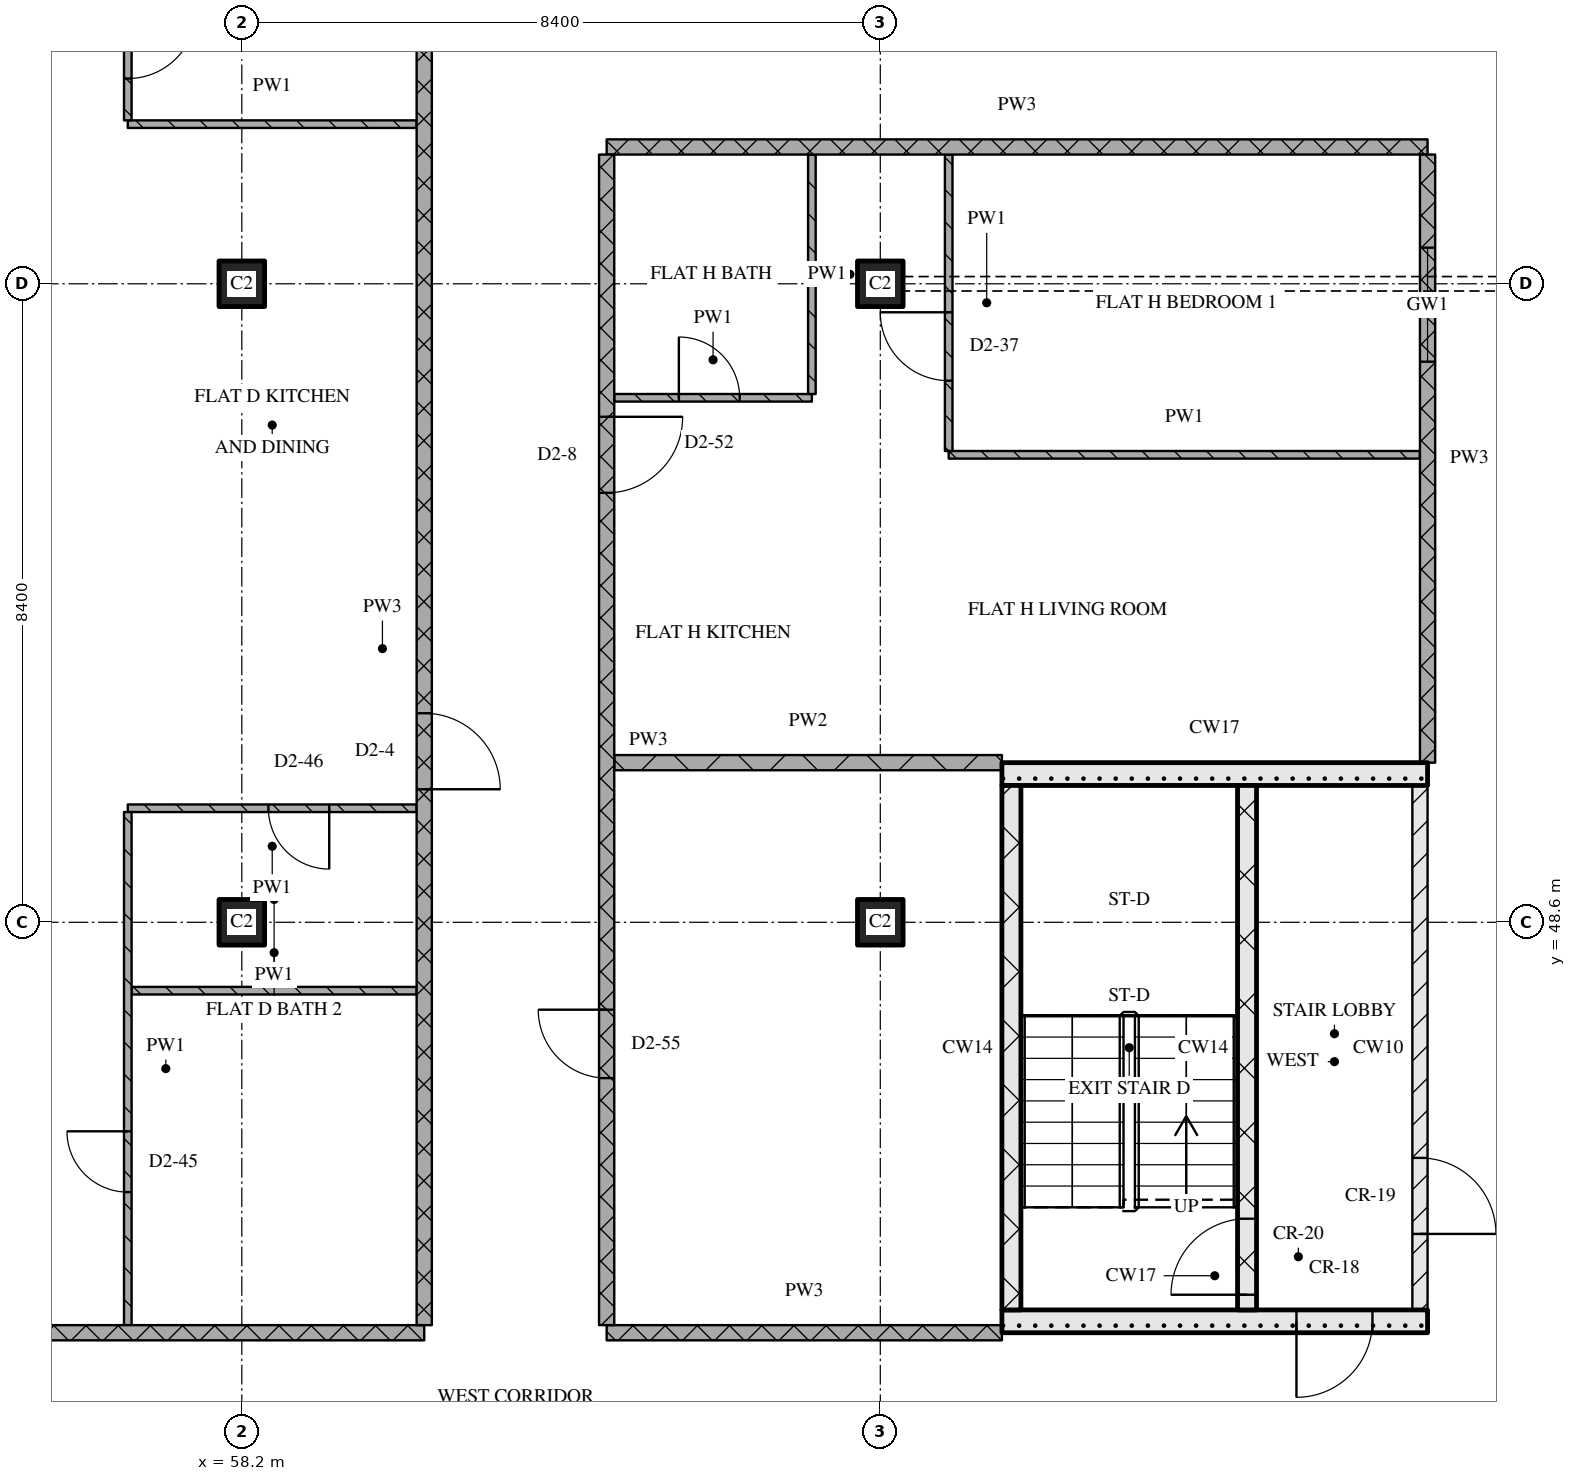
"""IFC4 building model, lengths in metres.
Left out: names, types, materials, properties, quantities, classifications, styles, units other than length and angle.
Written with IfcOpenShell. Run it as: python <this file> out.ifc"""

import sys

from ifc_helpers import new_model, si_unit, direction, frame, frame_2d, origin, origin_2d, place, context, subcontext, project, spatial, rectangle, extrude, element, fill, save


model = new_model("IFC4")
c1 = context("Model", 3, precision=1e-05, world=origin(), true_north=direction((0.0, 1.0)))
c2 = subcontext(c1, "Body", "Model", "MODEL_VIEW")
j1 = project(units=[si_unit("LENGTHUNIT", "METRE"), si_unit("PLANEANGLEUNIT", "RADIAN")], contexts=[c1])
p1 = place(None, origin())
s1 = spatial("IfcSite", under=j1, at=p1, CompositionType="ELEMENT")
p2 = place(p1, origin())
s2 = spatial("IfcBuilding", under=s1, at=p2, CompositionType="ELEMENT")
p3 = place(p2, frame((0.0, 0.0, 223.5)))
s3 = spatial("IfcBuildingStorey", under=s2, at=p3, CompositionType="ELEMENT", Elevation=223.5)
for number, where, z_axis, x_axis in (
    (1, (58.2, 48.6, 0.0), (0.0, 0.0, 1.0), (1.0, 0.0, 0.0)),
    (2, (58.2, 57.0, 0.0), (0.0, 0.0, 1.0), (1.0, 0.0, 0.0)),
    (3, (66.6, 48.6, 0.0), (0.0, 0.0, 1.0), (1.0, 0.0, 0.0)),
    (4, (66.6, 57.0, 0.0), (0.0, 0.0, 1.0), (1.0, 0.0, 0.0)),
):
    element("IfcColumn", number, at=place(p3, frame(where, z_axis=z_axis, x_axis=x_axis)), inside=s3, PredefinedType="COLUMN", context=c2, shape_type="SweptSolid", body=[
        extrude(rectangle(XDim=0.6, YDim=0.6, at=origin_2d()), origin(), (0.0, 0.0, 1.0), 3.6),
    ])
p4 = place(p3, frame((68.2, 43.35, 0.0), z_axis=(0.0, 0.0, 1.0), x_axis=(1.0, 0.0, 0.0)))
e5 = element("IfcWall", 5, at=p4, inside=s3, PredefinedType="SOLIDWALL", context=c2, shape_type="SweptSolid", body=[
    extrude(rectangle(XDim=5.6, YDim=0.3, at=frame_2d((2.8, 0.0))), origin(), (0.0, 0.0, 1.0), 3.32),
])
p5 = place(p4, frame((3.875, 0.0, 0.0)))
e6 = element("IfcOpeningElement", 6, at=p5, cuts=e5, PredefinedType="OPENING", context=c2, shape_type="SweptSolid", body=[
    extrude(rectangle(XDim=1.0, YDim=2.1, at=frame_2d((0.5, 1.05))), frame((0.0, 0.16, 0.0), z_axis=(0.0, -1.0, 0.0), x_axis=(1.0, 0.0, 0.0)), (0.0, 0.0, 1.0), 0.32),
])
p6 = place(p3, frame((68.325, 43.5, 0.0), z_axis=(0.0, 0.0, 1.0), x_axis=(0.0, 1.0, 0.0)))
e7 = element("IfcWall", 7, at=p6, inside=s3, PredefinedType="SOLIDWALL", context=c2, shape_type="SweptSolid", body=[
    extrude(rectangle(XDim=6.9, YDim=0.25, at=frame_2d((3.45, 0.0))), origin(), (0.0, 0.0, 1.0), 3.32),
])
p7 = place(p3, frame((71.425, 43.5, 0.0), z_axis=(0.0, 0.0, 1.0), x_axis=(0.0, 1.0, 0.0)))
e8 = element("IfcWall", 8, at=p7, inside=s3, PredefinedType="SOLIDWALL", context=c2, shape_type="SweptSolid", body=[
    extrude(rectangle(XDim=6.9, YDim=0.25, at=frame_2d((3.45, 0.0))), origin(), (0.0, 0.0, 1.0), 3.32),
])
p8 = place(p7, frame((0.2, 0.0, 0.0)))
e9 = element("IfcOpeningElement", 9, at=p8, cuts=e8, PredefinedType="OPENING", context=c2, shape_type="SweptSolid", body=[
    extrude(rectangle(XDim=1.0, YDim=2.1, at=frame_2d((0.5, 1.05))), frame((0.0, 0.135, 0.0), z_axis=(0.0, -1.0, 0.0), x_axis=(1.0, 0.0, 0.0)), (0.0, 0.0, 1.0), 0.27),
])
p9 = place(p3, frame((73.7, 43.5, 0.0), z_axis=(0.0, 0.0, 1.0), x_axis=(0.0, 1.0, 0.0)))
e10 = element("IfcWall", 10, at=p9, inside=s3, PredefinedType="PARTITIONING", context=c2, shape_type="SweptSolid", body=[
    extrude(rectangle(XDim=6.9, YDim=0.2, at=frame_2d((3.45, 0.0))), origin(), (0.0, 0.0, 1.0), 3.32),
])
p10 = place(p9, frame((1.0, 0.0, 0.0)))
e11 = element("IfcOpeningElement", 11, at=p10, cuts=e10, PredefinedType="OPENING", context=c2, shape_type="SweptSolid", body=[
    extrude(rectangle(XDim=1.0, YDim=2.1, at=frame_2d((0.5, 1.05))), frame((0.0, 0.11, 0.0), z_axis=(0.0, -1.0, 0.0), x_axis=(1.0, 0.0, 0.0)), (0.0, 0.0, 1.0), 0.22),
])
p11 = place(p3, frame((68.2, 50.55, 0.0), z_axis=(0.0, 0.0, 1.0), x_axis=(1.0, 0.0, 0.0)))
e12 = element("IfcWall", 12, at=p11, inside=s3, PredefinedType="SOLIDWALL", context=c2, shape_type="SweptSolid", body=[
    extrude(rectangle(XDim=5.6, YDim=0.3, at=frame_2d((2.8, 0.0))), origin(), (0.0, 0.0, 1.0), 3.32),
])
p12 = place(p3, frame((48.28, 43.2, 0.0), z_axis=(0.0, 0.0, 1.0), x_axis=(1.0, 0.0, 0.0)))
e13 = element("IfcWall", 13, at=p12, inside=s3, PredefinedType="PARTITIONING", context=c2, shape_type="SweptSolid", body=[
    extrude(rectangle(XDim=12.32, YDim=0.2, at=frame_2d((6.16, 0.0))), origin(), (0.0, 0.0, 1.0), 3.32),
])
p13 = place(p3, frame((63.0, 43.2, 0.0), z_axis=(0.0, 0.0, 1.0), x_axis=(1.0, 0.0, 0.0)))
e14 = element("IfcWall", 14, at=p13, inside=s3, PredefinedType="PARTITIONING", context=c2, shape_type="SweptSolid", body=[
    extrude(rectangle(XDim=5.2, YDim=0.2, at=frame_2d((2.6, 0.0))), origin(), (0.0, 0.0, 1.0), 3.32),
])
p14 = place(p3, frame((56.75, 47.7, 0.0), z_axis=(0.0, 0.0, 1.0), x_axis=(1.0, 0.0, 0.0)))
e15 = element("IfcWall", 15, at=p14, inside=s3, PredefinedType="PARTITIONING", context=c2, shape_type="SweptSolid", body=[
    extrude(rectangle(XDim=3.75, YDim=0.1, at=frame_2d((1.875, 0.0))), origin(), (0.0, 0.0, 1.0), 3.32),
])
p15 = place(p3, frame((60.5, 50.1, 0.0), z_axis=(0.0, 0.0, 1.0), x_axis=(-1.0, 0.0, 0.0)))
e16 = element("IfcWall", 16, at=p15, inside=s3, PredefinedType="PARTITIONING", context=c2, shape_type="SweptSolid", body=[
    extrude(rectangle(XDim=3.8, YDim=0.1, at=frame_2d((1.9, 0.0))), origin(), (0.0, 0.0, 1.0), 3.32),
])
p16 = place(p15, frame((1.15, 0.0, 0.0)))
e17 = element("IfcOpeningElement", 17, at=p16, cuts=e16, PredefinedType="OPENING", context=c2, shape_type="SweptSolid", body=[
    extrude(rectangle(XDim=0.8, YDim=2.1, at=frame_2d((0.4, 1.05))), frame((0.0, 0.06, 0.0), z_axis=(0.0, -1.0, 0.0), x_axis=(1.0, 0.0, 0.0)), (0.0, 0.0, 1.0), 0.12),
])
p17 = place(p3, frame((63.1, 50.7, 0.0), z_axis=(0.0, 0.0, 1.0), x_axis=(1.0, 0.0, 0.0)))
e18 = element("IfcWall", 18, at=p17, inside=s3, PredefinedType="PARTITIONING", context=c2, shape_type="SweptSolid", body=[
    extrude(rectangle(XDim=5.1, YDim=0.2, at=frame_2d((2.55, 0.0))), origin(), (0.0, 0.0, 1.0), 3.32),
])
p18 = place(p3, frame((67.5, 54.75, 0.0), z_axis=(0.0, 0.0, 1.0), x_axis=(1.0, 0.0, 0.0)))
e19 = element("IfcWall", 19, at=p18, inside=s3, PredefinedType="PARTITIONING", context=c2, shape_type="SweptSolid", body=[
    extrude(rectangle(XDim=6.2, YDim=0.1, at=frame_2d((3.1, 0.0))), origin(), (0.0, 0.0, 1.0), 3.32),
])
p19 = place(p3, frame((63.1, 55.5, 0.0), z_axis=(0.0, 0.0, 1.0), x_axis=(1.0, 0.0, 0.0)))
e20 = element("IfcWall", 20, at=p19, inside=s3, PredefinedType="PARTITIONING", context=c2, shape_type="SweptSolid", body=[
    extrude(rectangle(XDim=2.6, YDim=0.1, at=frame_2d((1.3, 0.0))), origin(), (0.0, 0.0, 1.0), 3.32),
])
p20 = place(p19, frame((0.85, 0.0, 0.0)))
e21 = element("IfcOpeningElement", 21, at=p20, cuts=e20, PredefinedType="OPENING", context=c2, shape_type="SweptSolid", body=[
    extrude(rectangle(XDim=0.8, YDim=2.1, at=frame_2d((0.4, 1.05))), frame((0.0, 0.06, 0.0), z_axis=(0.0, -1.0, 0.0), x_axis=(1.0, 0.0, 0.0)), (0.0, 0.0, 1.0), 0.12),
])
p21 = place(p3, frame((63.0, 58.8, 0.0), z_axis=(0.0, 0.0, 1.0), x_axis=(1.0, 0.0, 0.0)))
e22 = element("IfcWall", 22, at=p21, inside=s3, PredefinedType="PARTITIONING", context=c2, shape_type="SweptSolid", body=[
    extrude(rectangle(XDim=10.8, YDim=0.2, at=frame_2d((5.4, 0.0))), origin(), (0.0, 0.0, 1.0), 3.32),
])
p22 = place(p3, frame((56.7, 59.1, 0.0), z_axis=(0.0, 0.0, 1.0), x_axis=(1.0, 0.0, 0.0)))
e23 = element("IfcWall", 23, at=p22, inside=s3, PredefinedType="PARTITIONING", context=c2, shape_type="SweptSolid", body=[
    extrude(rectangle(XDim=3.8, YDim=0.1, at=frame_2d((1.9, 0.0))), origin(), (0.0, 0.0, 1.0), 3.32),
])
p23 = place(p3, frame((56.7, 50.05, 0.0), z_axis=(0.0, 0.0, 1.0), x_axis=(0.0, -1.0, 0.0)))
e24 = element("IfcWall", 24, at=p23, inside=s3, PredefinedType="PARTITIONING", context=c2, shape_type="SweptSolid", body=[
    extrude(rectangle(XDim=6.75, YDim=0.1, at=frame_2d((3.375, 0.0))), origin(), (0.0, 0.0, 1.0), 3.32),
])
p24 = place(p23, frame((4.2, 0.0, 0.0)))
e25 = element("IfcOpeningElement", 25, at=p24, cuts=e24, PredefinedType="OPENING", context=c2, shape_type="SweptSolid", body=[
    extrude(rectangle(XDim=0.8, YDim=2.1, at=frame_2d((0.4, 1.05))), frame((0.0, 0.06, 0.0), z_axis=(0.0, -1.0, 0.0), x_axis=(1.0, 0.0, 0.0)), (0.0, 0.0, 1.0), 0.12),
])
p25 = place(p3, frame((56.7, 61.1, 0.0), z_axis=(0.0, 0.0, 1.0), x_axis=(0.0, -1.0, 0.0)))
e26 = element("IfcWall", 26, at=p25, inside=s3, PredefinedType="PARTITIONING", context=c2, shape_type="SweptSolid", body=[
    extrude(rectangle(XDim=1.95, YDim=0.1, at=frame_2d((0.975, 0.0))), origin(), (0.0, 0.0, 1.0), 3.32),
])
p26 = place(p25, frame((0.5, 0.0, 0.0)))
e27 = element("IfcOpeningElement", 27, at=p26, cuts=e26, PredefinedType="OPENING", context=c2, shape_type="SweptSolid", body=[
    extrude(rectangle(XDim=0.9, YDim=2.1, at=frame_2d((0.45, 1.05))), frame((0.0, 0.06, 0.0), z_axis=(0.0, -1.0, 0.0), x_axis=(1.0, 0.0, 0.0)), (0.0, 0.0, 1.0), 0.12),
])
p27 = place(p3, frame((60.6, 43.3, 0.0), z_axis=(0.0, 0.0, 1.0), x_axis=(0.0, 1.0, 0.0)))
e28 = element("IfcWall", 28, at=p27, inside=s3, PredefinedType="PARTITIONING", context=c2, shape_type="SweptSolid", body=[
    extrude(rectangle(XDim=17.8, YDim=0.2, at=frame_2d((8.9, 0.0))), origin(), (0.0, 0.0, 1.0), 3.32),
])
p28 = place(p27, frame((7.05, 0.0, 0.0)))
e29 = element("IfcOpeningElement", 29, at=p28, cuts=e28, PredefinedType="OPENING", context=c2, shape_type="SweptSolid", body=[
    extrude(rectangle(XDim=1.0, YDim=2.1, at=frame_2d((0.5, 1.05))), frame((0.0, 0.11, 0.0), z_axis=(0.0, -1.0, 0.0), x_axis=(1.0, 0.0, 0.0)), (0.0, 0.0, 1.0), 0.22),
])
p29 = place(p3, frame((63.0, 58.7, 0.0), z_axis=(0.0, 0.0, 1.0), x_axis=(0.0, -1.0, 0.0)))
e30 = element("IfcWall", 30, at=p29, inside=s3, PredefinedType="PARTITIONING", context=c2, shape_type="SweptSolid", body=[
    extrude(rectangle(XDim=15.4, YDim=0.2, at=frame_2d((7.7, 0.0))), origin(), (0.0, 0.0, 1.0), 3.32),
])
p30 = place(p29, frame((3.45, 0.0, 0.0)))
e31 = element("IfcOpeningElement", 31, at=p30, cuts=e30, PredefinedType="OPENING", context=c2, shape_type="SweptSolid", body=[
    extrude(rectangle(XDim=1.0, YDim=2.1, at=frame_2d((0.5, 1.05))), frame((0.0, 0.11, 0.0), z_axis=(0.0, -1.0, 0.0), x_axis=(1.0, 0.0, 0.0)), (0.0, 0.0, 1.0), 0.22),
])
p31 = place(p29, frame((11.25, 0.0, 0.0)))
e32 = element("IfcOpeningElement", 32, at=p31, cuts=e30, PredefinedType="OPENING", context=c2, shape_type="SweptSolid", body=[
    extrude(rectangle(XDim=0.9, YDim=2.1, at=frame_2d((0.45, 1.05))), frame((0.0, 0.11, 0.0), z_axis=(0.0, -1.0, 0.0), x_axis=(1.0, 0.0, 0.0)), (0.0, 0.0, 1.0), 0.22),
])
p32 = place(p3, frame((65.7, 58.7, 0.0), z_axis=(0.0, 0.0, 1.0), x_axis=(0.0, -1.0, 0.0)))
e33 = element("IfcWall", 33, at=p32, inside=s3, PredefinedType="PARTITIONING", context=c2, shape_type="SweptSolid", body=[
    extrude(rectangle(XDim=3.15, YDim=0.1, at=frame_2d((1.575, 0.0))), origin(), (0.0, 0.0, 1.0), 3.32),
])
p33 = place(p3, frame((67.5, 58.7, 0.0), z_axis=(0.0, 0.0, 1.0), x_axis=(0.0, -1.0, 0.0)))
e34 = element("IfcWall", 34, at=p33, inside=s3, PredefinedType="PARTITIONING", context=c2, shape_type="SweptSolid", body=[
    extrude(rectangle(XDim=3.9, YDim=0.1, at=frame_2d((1.95, 0.0))), origin(), (0.0, 0.0, 1.0), 3.32),
])
p34 = place(p33, frame((2.075, 0.0, 0.0)))
e35 = element("IfcOpeningElement", 35, at=p34, cuts=e34, PredefinedType="OPENING", context=c2, shape_type="SweptSolid", body=[
    extrude(rectangle(XDim=0.9, YDim=2.1, at=frame_2d((0.45, 1.05))), frame((0.0, 0.06, 0.0), z_axis=(0.0, -1.0, 0.0), x_axis=(1.0, 0.0, 0.0)), (0.0, 0.0, 1.0), 0.12),
])
p35 = place(p3, frame((73.8, 58.7, 0.0), z_axis=(0.0, 0.0, 1.0), x_axis=(0.0, -1.0, 0.0)))
e36 = element("IfcWall", 36, at=p35, inside=s3, PredefinedType="PARTITIONING", context=c2, shape_type="SweptSolid", body=[
    extrude(rectangle(XDim=8.0, YDim=0.2, at=frame_2d((4.0, 0.0))), origin(), (0.0, 0.0, 1.0), 3.32),
])
p36 = place(p35, frame((1.225, 0.0, 0.9)))
e37 = element("IfcOpeningElement", 37, at=p36, cuts=e36, PredefinedType="OPENING", context=c2, shape_type="SweptSolid", body=[
    extrude(rectangle(XDim=1.5, YDim=1.5, at=frame_2d((0.75, 0.75))), frame((0.0, 0.11, 0.0), z_axis=(0.0, -1.0, 0.0), x_axis=(1.0, 0.0, 0.0)), (0.0, 0.0, 1.0), 0.22),
])
p37 = place(p5, origin())
e38 = element("IfcDoor", 38, at=p37, inside=s3, OperationType="SINGLE_SWING_RIGHT", PredefinedType="DOOR", context=c2, shape_type="SweptSolid", body=[
    extrude(rectangle(XDim=1.0, YDim=2.1, at=frame_2d((0.5, 1.05))), frame((0.0, 0.025, 0.0), z_axis=(0.0, -1.0, 0.0), x_axis=(1.0, 0.0, 0.0)), (0.0, 0.0, 1.0), 0.05),
])
fill(e6, e38)
p38 = place(p8, origin())
e39 = element("IfcDoor", 39, at=p38, inside=s3, OperationType="SINGLE_SWING_LEFT", PredefinedType="DOOR", context=c2, shape_type="SweptSolid", body=[
    extrude(rectangle(XDim=1.0, YDim=2.1, at=frame_2d((0.5, 1.05))), frame((0.0, 0.025, 0.0), z_axis=(0.0, -1.0, 0.0), x_axis=(1.0, 0.0, 0.0)), (0.0, 0.0, 1.0), 0.05),
])
fill(e9, e39)
p39 = place(p10, origin())
e40 = element("IfcDoor", 40, at=p39, inside=s3, OperationType="SINGLE_SWING_RIGHT", PredefinedType="DOOR", context=c2, shape_type="SweptSolid", body=[
    extrude(rectangle(XDim=1.0, YDim=2.1, at=frame_2d((0.5, 1.05))), frame((0.0, 0.025, 0.0), z_axis=(0.0, -1.0, 0.0), x_axis=(1.0, 0.0, 0.0)), (0.0, 0.0, 1.0), 0.05),
])
fill(e11, e40)
p40 = place(p16, origin())
e41 = element("IfcDoor", 41, at=p40, inside=s3, OperationType="SINGLE_SWING_LEFT", PredefinedType="DOOR", context=c2, shape_type="SweptSolid", body=[
    extrude(rectangle(XDim=0.8, YDim=2.1, at=frame_2d((0.4, 1.05))), frame((0.0, 0.025, 0.0), z_axis=(0.0, -1.0, 0.0), x_axis=(1.0, 0.0, 0.0)), (0.0, 0.0, 1.0), 0.05),
])
fill(e17, e41)
p41 = place(p20, origin())
e42 = element("IfcDoor", 42, at=p41, inside=s3, OperationType="SINGLE_SWING_LEFT", PredefinedType="DOOR", context=c2, shape_type="SweptSolid", body=[
    extrude(rectangle(XDim=0.8, YDim=2.1, at=frame_2d((0.4, 1.05))), frame((0.0, 0.025, 0.0), z_axis=(0.0, -1.0, 0.0), x_axis=(1.0, 0.0, 0.0)), (0.0, 0.0, 1.0), 0.05),
])
fill(e21, e42)
p42 = place(p24, origin())
e43 = element("IfcDoor", 43, at=p42, inside=s3, OperationType="SINGLE_SWING_RIGHT", PredefinedType="DOOR", context=c2, shape_type="SweptSolid", body=[
    extrude(rectangle(XDim=0.8, YDim=2.1, at=frame_2d((0.4, 1.05))), frame((0.0, 0.025, 0.0), z_axis=(0.0, -1.0, 0.0), x_axis=(1.0, 0.0, 0.0)), (0.0, 0.0, 1.0), 0.05),
])
fill(e25, e43)
p43 = place(p26, origin())
e44 = element("IfcDoor", 44, at=p43, inside=s3, OperationType="SINGLE_SWING_LEFT", PredefinedType="DOOR", context=c2, shape_type="SweptSolid", body=[
    extrude(rectangle(XDim=0.9, YDim=2.1, at=frame_2d((0.45, 1.05))), frame((0.0, 0.025, 0.0), z_axis=(0.0, -1.0, 0.0), x_axis=(1.0, 0.0, 0.0)), (0.0, 0.0, 1.0), 0.05),
])
fill(e27, e44)
p44 = place(p28, origin())
e45 = element("IfcDoor", 45, at=p44, inside=s3, OperationType="SINGLE_SWING_RIGHT", PredefinedType="DOOR", context=c2, shape_type="SweptSolid", body=[
    extrude(rectangle(XDim=1.0, YDim=2.1, at=frame_2d((0.5, 1.05))), frame((0.0, 0.025, 0.0), z_axis=(0.0, -1.0, 0.0), x_axis=(1.0, 0.0, 0.0)), (0.0, 0.0, 1.0), 0.05),
])
fill(e29, e45)
p45 = place(p30, origin())
e46 = element("IfcDoor", 46, at=p45, inside=s3, OperationType="SINGLE_SWING_LEFT", PredefinedType="DOOR", context=c2, shape_type="SweptSolid", body=[
    extrude(rectangle(XDim=1.0, YDim=2.1, at=frame_2d((0.5, 1.05))), frame((0.0, 0.025, 0.0), z_axis=(0.0, -1.0, 0.0), x_axis=(1.0, 0.0, 0.0)), (0.0, 0.0, 1.0), 0.05),
])
fill(e31, e46)
p46 = place(p31, origin())
e47 = element("IfcDoor", 47, at=p46, inside=s3, OperationType="SINGLE_SWING_RIGHT", PredefinedType="DOOR", context=c2, shape_type="SweptSolid", body=[
    extrude(rectangle(XDim=0.9, YDim=2.1, at=frame_2d((0.45, 1.05))), frame((0.0, 0.025, 0.0), z_axis=(0.0, -1.0, 0.0), x_axis=(1.0, 0.0, 0.0)), (0.0, 0.0, 1.0), 0.05),
])
fill(e32, e47)
p47 = place(p34, origin())
e48 = element("IfcDoor", 48, at=p47, inside=s3, OperationType="SINGLE_SWING_RIGHT", PredefinedType="DOOR", context=c2, shape_type="SweptSolid", body=[
    extrude(rectangle(XDim=0.9, YDim=2.1, at=frame_2d((0.45, 1.05))), frame((0.0, 0.025, 0.0), z_axis=(0.0, -1.0, 0.0), x_axis=(1.0, 0.0, 0.0)), (0.0, 0.0, 1.0), 0.05),
])
fill(e35, e48)
p48 = place(p36, origin())
e49 = element("IfcWindow", 49, at=p48, inside=s3, PartitioningType="SINGLE_PANEL", PredefinedType="WINDOW", context=c2, shape_type="SweptSolid", body=[
    extrude(rectangle(XDim=1.5, YDim=1.5, at=frame_2d((0.75, 0.75))), frame((0.0, 0.03, 0.0), z_axis=(0.0, -1.0, 0.0), x_axis=(1.0, 0.0, 0.0)), (0.0, 0.0, 1.0), 0.06),
])
fill(e37, e49)
save(model, sys.argv[1])
